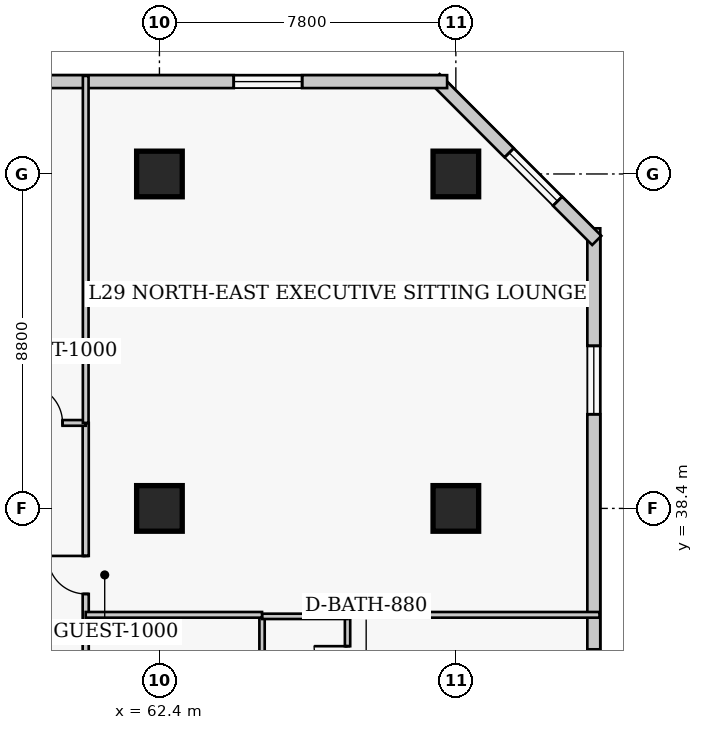
"""IFC4 building model, lengths in metres.
Left out: names, types, materials, properties, quantities, classifications, styles, units other than length and angle.
Written with IfcOpenShell. Run it as: python <this file> out.ifc"""

import sys

from ifc_helpers import new_model, si_unit, direction, frame, frame_2d, origin, origin_2d, place, context, subcontext, project, spatial, rectangle, extrude, element, fill, save


model = new_model("IFC4")
c1 = context("Model", 3, precision=1e-05, world=origin(), true_north=direction((0.0, 1.0)))
c2 = subcontext(c1, "Body", "Model", "MODEL_VIEW")
j1 = project(units=[si_unit("LENGTHUNIT", "METRE"), si_unit("PLANEANGLEUNIT", "RADIAN")], contexts=[c1])
p1 = place(None, origin())
s1 = spatial("IfcSite", under=j1, at=p1, CompositionType="ELEMENT")
p2 = place(p1, origin())
s2 = spatial("IfcBuilding", under=s1, at=p2, CompositionType="ELEMENT")
p3 = place(p2, frame((0.0, 0.0, 118.4)))
s3 = spatial("IfcBuildingStorey", under=s2, at=p3, CompositionType="ELEMENT", Elevation=118.4)
for number, where, z_axis, x_axis in (
    (1, (62.4, 38.4, 0.0), (0.0, 0.0, 1.0), (1.0, 0.0, 0.0)),
    (2, (62.4, 47.2, 0.0), (0.0, 0.0, 1.0), (1.0, 0.0, 0.0)),
    (3, (70.2, 38.4, 0.0), (0.0, 0.0, 1.0), (1.0, 0.0, 0.0)),
    (4, (70.2, 47.2, 0.0), (0.0, 0.0, 1.0), (1.0, 0.0, 0.0)),
):
    element("IfcColumn", number, at=place(p3, frame(where, z_axis=z_axis, x_axis=x_axis)), inside=s3, PredefinedType="COLUMN", context=c2, shape_type="SweptSolid", body=[
        extrude(rectangle(XDim=1.2, YDim=1.2, at=origin_2d()), origin(), (0.0, 0.0, 1.0), 3.8),
    ])
p4 = place(p3, frame((73.83, 13.83, 0.0), z_axis=(0.0, 0.0, 1.0), x_axis=(0.0, 1.0, 0.0)))
e5 = element("IfcWall", 5, at=p4, inside=s3, PredefinedType="SOLIDWALL", context=c2, shape_type="SweptSolid", body=[
    extrude(rectangle(XDim=31.94, YDim=0.34, at=frame_2d((15.97, 0.0))), origin(), (0.0, 0.0, 1.0), 3.54),
])
p5 = place(p4, frame((3.093, 0.0, 0.85)))
e6 = element("IfcOpeningElement", 6, at=p5, cuts=e5, PredefinedType="OPENING", context=c2, shape_type="SweptSolid", body=[
    extrude(rectangle(XDim=1.8, YDim=1.8, at=frame_2d((0.9, 0.9))), frame((0.0, 0.18, 0.0), z_axis=(0.0, -1.0, 0.0), x_axis=(1.0, 0.0, 0.0)), (0.0, 0.0, 1.0), 0.36),
])
p6 = place(p4, frame((11.077, 0.0, 0.85)))
e7 = element("IfcOpeningElement", 7, at=p6, cuts=e5, PredefinedType="OPENING", context=c2, shape_type="SweptSolid", body=[
    extrude(rectangle(XDim=1.8, YDim=1.8, at=frame_2d((0.9, 0.9))), frame((0.0, 0.18, 0.0), z_axis=(0.0, -1.0, 0.0), x_axis=(1.0, 0.0, 0.0)), (0.0, 0.0, 1.0), 0.36),
])
p7 = place(p4, frame((19.062, 0.0, 0.85)))
e8 = element("IfcOpeningElement", 8, at=p7, cuts=e5, PredefinedType="OPENING", context=c2, shape_type="SweptSolid", body=[
    extrude(rectangle(XDim=1.8, YDim=1.8, at=frame_2d((0.9, 0.9))), frame((0.0, 0.18, 0.0), z_axis=(0.0, -1.0, 0.0), x_axis=(1.0, 0.0, 0.0)), (0.0, 0.0, 1.0), 0.36),
])
p8 = place(p4, frame((27.048, 0.0, 0.85)))
e9 = element("IfcOpeningElement", 9, at=p8, cuts=e5, PredefinedType="OPENING", context=c2, shape_type="SweptSolid", body=[
    extrude(rectangle(XDim=1.8, YDim=1.8, at=frame_2d((0.9, 0.9))), frame((0.0, 0.18, 0.0), z_axis=(0.0, -1.0, 0.0), x_axis=(1.0, 0.0, 0.0)), (0.0, 0.0, 1.0), 0.36),
])
p9 = place(p3, frame((73.908, 45.451, 0.0), z_axis=(0.0, 0.0, 1.0), x_axis=(-0.707106781187, 0.707106781187, 0.0)))
e10 = element("IfcWall", 10, at=p9, inside=s3, PredefinedType="SOLIDWALL", context=c2, shape_type="SweptSolid", body=[
    extrude(rectangle(XDim=6.02, YDim=0.34, at=frame_2d((3.01, 0.0))), origin(), (0.0, 0.0, 1.0), 3.54),
])
p10 = place(p9, frame((1.46, 0.0, 0.85)))
e11 = element("IfcOpeningElement", 11, at=p10, cuts=e10, PredefinedType="OPENING", context=c2, shape_type="SweptSolid", body=[
    extrude(rectangle(XDim=1.8, YDim=1.8, at=frame_2d((0.9, 0.9))), frame((0.0, 0.18, 0.0), z_axis=(0.0, -1.0, 0.0), x_axis=(1.0, 0.0, 0.0)), (0.0, 0.0, 1.0), 0.36),
])
p11 = place(p3, frame((69.97, 49.63, 0.0), z_axis=(0.0, 0.0, 1.0), x_axis=(-1.0, 0.0, 0.0)))
e12 = element("IfcWall", 12, at=p11, inside=s3, PredefinedType="SOLIDWALL", context=c2, shape_type="SweptSolid", body=[
    extrude(rectangle(XDim=28.29, YDim=0.34, at=frame_2d((14.145, 0.0))), origin(), (0.0, 0.0, 1.0), 3.54),
])
p12 = place(p11, frame((3.815, 0.0, 0.85)))
e13 = element("IfcOpeningElement", 13, at=p12, cuts=e12, PredefinedType="OPENING", context=c2, shape_type="SweptSolid", body=[
    extrude(rectangle(XDim=1.8, YDim=1.8, at=frame_2d((0.9, 0.9))), frame((0.0, 0.18, 0.0), z_axis=(0.0, -1.0, 0.0), x_axis=(1.0, 0.0, 0.0)), (0.0, 0.0, 1.0), 0.36),
])
p13 = place(p11, frame((13.245, 0.0, 0.85)))
e14 = element("IfcOpeningElement", 14, at=p13, cuts=e12, PredefinedType="OPENING", context=c2, shape_type="SweptSolid", body=[
    extrude(rectangle(XDim=1.8, YDim=1.8, at=frame_2d((0.9, 0.9))), frame((0.0, 0.18, 0.0), z_axis=(0.0, -1.0, 0.0), x_axis=(1.0, 0.0, 0.0)), (0.0, 0.0, 1.0), 0.36),
])
p14 = place(p11, frame((22.675, 0.0, 0.85)))
e15 = element("IfcOpeningElement", 15, at=p14, cuts=e12, PredefinedType="OPENING", context=c2, shape_type="SweptSolid", body=[
    extrude(rectangle(XDim=1.8, YDim=1.8, at=frame_2d((0.9, 0.9))), frame((0.0, 0.18, 0.0), z_axis=(0.0, -1.0, 0.0), x_axis=(1.0, 0.0, 0.0)), (0.0, 0.0, 1.0), 0.36),
])
p15 = place(p3, frame((60.46, 11.85, 0.0), z_axis=(0.0, 0.0, 1.0), x_axis=(0.0, 1.0, 0.0)))
e16 = element("IfcWall", 16, at=p15, inside=s3, PredefinedType="PARTITIONING", context=c2, shape_type="SweptSolid", body=[
    extrude(rectangle(XDim=28.8, YDim=0.16, at=frame_2d((14.4, 0.0))), origin(), (0.0, 0.0, 1.0), 3.54),
])
p16 = place(p15, frame((3.6, 0.0, 0.0)))
e17 = element("IfcOpeningElement", 17, at=p16, cuts=e16, PredefinedType="OPENING", context=c2, shape_type="SweptSolid", body=[
    extrude(rectangle(XDim=0.95, YDim=2.1, at=frame_2d((0.475, 1.05))), frame((0.0, 0.09, 0.0), z_axis=(0.0, -1.0, 0.0), x_axis=(1.0, 0.0, 0.0)), (0.0, 0.0, 1.0), 0.18),
])
p17 = place(p15, frame((12.075, 0.0, 0.0)))
e18 = element("IfcOpeningElement", 18, at=p17, cuts=e16, PredefinedType="OPENING", context=c2, shape_type="SweptSolid", body=[
    extrude(rectangle(XDim=0.95, YDim=2.1, at=frame_2d((0.475, 1.05))), frame((0.0, 0.09, 0.0), z_axis=(0.0, -1.0, 0.0), x_axis=(1.0, 0.0, 0.0)), (0.0, 0.0, 1.0), 0.18),
])
p18 = place(p15, frame((19.875, 0.0, 0.0)))
e19 = element("IfcOpeningElement", 19, at=p18, cuts=e16, PredefinedType="OPENING", context=c2, shape_type="SweptSolid", body=[
    extrude(rectangle(XDim=0.95, YDim=2.1, at=frame_2d((0.475, 1.05))), frame((0.0, 0.09, 0.0), z_axis=(0.0, -1.0, 0.0), x_axis=(1.0, 0.0, 0.0)), (0.0, 0.0, 1.0), 0.18),
])
p19 = place(p15, frame((24.3, 0.0, 0.0)))
e20 = element("IfcOpeningElement", 20, at=p19, cuts=e16, PredefinedType="OPENING", context=c2, shape_type="SweptSolid", body=[
    extrude(rectangle(XDim=1.0, YDim=2.15, at=frame_2d((0.5, 1.075))), frame((0.0, 0.09, 0.0), z_axis=(0.0, -1.0, 0.0), x_axis=(1.0, 0.0, 0.0)), (0.0, 0.0, 1.0), 0.18),
])
p20 = place(p3, frame((56.8, 40.65, 0.0), z_axis=(0.0, 0.0, 1.0), x_axis=(1.0, 0.0, 0.0)))
e21 = element("IfcWall", 21, at=p20, inside=s3, PredefinedType="PARTITIONING", context=c2, shape_type="SweptSolid", body=[
    extrude(rectangle(XDim=3.66, YDim=0.15, at=frame_2d((1.83, 0.0))), origin(), (0.0, 0.0, 1.0), 3.54),
])
p21 = place(p20, frame((2.05, 0.0, 0.0)))
e22 = element("IfcOpeningElement", 22, at=p21, cuts=e21, PredefinedType="OPENING", context=c2, shape_type="SweptSolid", body=[
    extrude(rectangle(XDim=1.0, YDim=2.15, at=frame_2d((0.5, 1.075))), frame((0.0, 0.085, 0.0), z_axis=(0.0, -1.0, 0.0), x_axis=(1.0, 0.0, 0.0)), (0.0, 0.0, 1.0), 0.17),
])
p22 = place(p3, frame((60.46, 40.65, 0.0), z_axis=(0.0, 0.0, 1.0), x_axis=(0.0, 1.0, 0.0)))
e23 = element("IfcWall", 23, at=p22, inside=s3, PredefinedType="PARTITIONING", context=c2, shape_type="SweptSolid", body=[
    extrude(rectangle(XDim=9.13, YDim=0.15, at=frame_2d((4.565, 0.0))), origin(), (0.0, 0.0, 1.0), 3.54),
])
p23 = place(p3, frame((65.1, 33.11, 0.0), z_axis=(0.0, 0.0, 1.0), x_axis=(0.0, 1.0, 0.0)))
e24 = element("IfcWall", 24, at=p23, inside=s3, PredefinedType="PLUMBINGWALL", context=c2, shape_type="SweptSolid", body=[
    extrude(rectangle(XDim=2.45, YDim=0.14, at=frame_2d((1.225, 0.0))), origin(), (0.0, 0.0, 1.0), 3.54),
])
p24 = place(p3, frame((67.35, 33.11, 0.0), z_axis=(0.0, 0.0, 1.0), x_axis=(0.0, 1.0, 0.0)))
e25 = element("IfcWall", 25, at=p24, inside=s3, PredefinedType="PLUMBINGWALL", context=c2, shape_type="SweptSolid", body=[
    extrude(rectangle(XDim=2.45, YDim=0.14, at=frame_2d((1.225, 0.0))), origin(), (0.0, 0.0, 1.0), 3.54),
])
p25 = place(p24, frame((0.785, 0.0, 0.0)))
e26 = element("IfcOpeningElement", 26, at=p25, cuts=e25, PredefinedType="OPENING", context=c2, shape_type="SweptSolid", body=[
    extrude(rectangle(XDim=0.88, YDim=2.05, at=frame_2d((0.44, 1.025))), frame((0.0, 0.08, 0.0), z_axis=(0.0, -1.0, 0.0), x_axis=(1.0, 0.0, 0.0)), (0.0, 0.0, 1.0), 0.16),
])
p26 = place(p3, frame((65.1, 35.56, 0.0), z_axis=(0.0, 0.0, 1.0), x_axis=(1.0, 0.0, 0.0)))
e27 = element("IfcWall", 27, at=p26, inside=s3, PredefinedType="PLUMBINGWALL", context=c2, shape_type="SweptSolid", body=[
    extrude(rectangle(XDim=2.25, YDim=0.14, at=frame_2d((1.125, 0.0))), origin(), (0.0, 0.0, 1.0), 3.54),
])
p27 = place(p3, frame((60.46, 35.6, 0.0), z_axis=(0.0, 0.0, 1.0), x_axis=(1.0, 0.0, 0.0)))
e28 = element("IfcWall", 28, at=p27, inside=s3, PredefinedType="PARTITIONING", context=c2, shape_type="SweptSolid", body=[
    extrude(rectangle(XDim=4.64, YDim=0.15, at=frame_2d((2.32, 0.0))), origin(), (0.0, 0.0, 1.0), 3.54),
])
p28 = place(p3, frame((67.35, 35.6, 0.0), z_axis=(0.0, 0.0, 1.0), x_axis=(1.0, 0.0, 0.0)))
e29 = element("IfcWall", 29, at=p28, inside=s3, PredefinedType="PARTITIONING", context=c2, shape_type="SweptSolid", body=[
    extrude(rectangle(XDim=6.63, YDim=0.15, at=frame_2d((3.315, 0.0))), origin(), (0.0, 0.0, 1.0), 3.54),
])
p29 = place(p7, origin())
e30 = element("IfcWindow", 30, at=p29, inside=s3, PartitioningType="SINGLE_PANEL", PredefinedType="WINDOW", context=c2, shape_type="SweptSolid", body=[
    extrude(rectangle(XDim=1.8, YDim=1.8, at=frame_2d((0.9, 0.9))), frame((0.0, 0.03, 0.0), z_axis=(0.0, -1.0, 0.0), x_axis=(1.0, 0.0, 0.0)), (0.0, 0.0, 1.0), 0.06),
])
fill(e8, e30)
p30 = place(p8, origin())
e31 = element("IfcWindow", 31, at=p30, inside=s3, PartitioningType="SINGLE_PANEL", PredefinedType="WINDOW", context=c2, shape_type="SweptSolid", body=[
    extrude(rectangle(XDim=1.8, YDim=1.8, at=frame_2d((0.9, 0.9))), frame((0.0, 0.03, 0.0), z_axis=(0.0, -1.0, 0.0), x_axis=(1.0, 0.0, 0.0)), (0.0, 0.0, 1.0), 0.06),
])
fill(e9, e31)
p31 = place(p10, origin())
e32 = element("IfcWindow", 32, at=p31, inside=s3, PartitioningType="SINGLE_PANEL", PredefinedType="WINDOW", context=c2, shape_type="SweptSolid", body=[
    extrude(rectangle(XDim=1.8, YDim=1.8, at=frame_2d((0.9, 0.9))), frame((0.0, 0.03, 0.0), z_axis=(0.0, -1.0, 0.0), x_axis=(1.0, 0.0, 0.0)), (0.0, 0.0, 1.0), 0.06),
])
fill(e11, e32)
p32 = place(p12, origin())
e33 = element("IfcWindow", 33, at=p32, inside=s3, PartitioningType="SINGLE_PANEL", PredefinedType="WINDOW", context=c2, shape_type="SweptSolid", body=[
    extrude(rectangle(XDim=1.8, YDim=1.8, at=frame_2d((0.9, 0.9))), frame((0.0, 0.03, 0.0), z_axis=(0.0, -1.0, 0.0), x_axis=(1.0, 0.0, 0.0)), (0.0, 0.0, 1.0), 0.06),
])
fill(e13, e33)
p33 = place(p21, origin())
e34 = element("IfcDoor", 34, at=p33, inside=s3, OperationType="SINGLE_SWING_LEFT", PredefinedType="DOOR", context=c2, shape_type="SweptSolid", body=[
    extrude(rectangle(XDim=1.0, YDim=2.15, at=frame_2d((0.5, 1.075))), frame((0.0, 0.025, 0.0), z_axis=(0.0, -1.0, 0.0), x_axis=(1.0, 0.0, 0.0)), (0.0, 0.0, 1.0), 0.05),
])
fill(e22, e34)
p34 = place(p25, origin())
e35 = element("IfcDoor", 35, at=p34, inside=s3, OperationType="SINGLE_SWING_RIGHT", PredefinedType="DOOR", context=c2, shape_type="SweptSolid", body=[
    extrude(rectangle(XDim=0.88, YDim=2.05, at=frame_2d((0.44, 1.025))), frame((0.0, 0.025, 0.0), z_axis=(0.0, -1.0, 0.0), x_axis=(1.0, 0.0, 0.0)), (0.0, 0.0, 1.0), 0.05),
])
fill(e26, e35)
p35 = place(p19, origin())
e36 = element("IfcDoor", 36, at=p35, inside=s3, OperationType="SINGLE_SWING_RIGHT", PredefinedType="DOOR", context=c2, shape_type="SweptSolid", body=[
    extrude(rectangle(XDim=1.0, YDim=2.15, at=frame_2d((0.5, 1.075))), frame((0.0, 0.025, 0.0), z_axis=(0.0, -1.0, 0.0), x_axis=(1.0, 0.0, 0.0)), (0.0, 0.0, 1.0), 0.05),
])
fill(e20, e36)
save(model, sys.argv[1])
